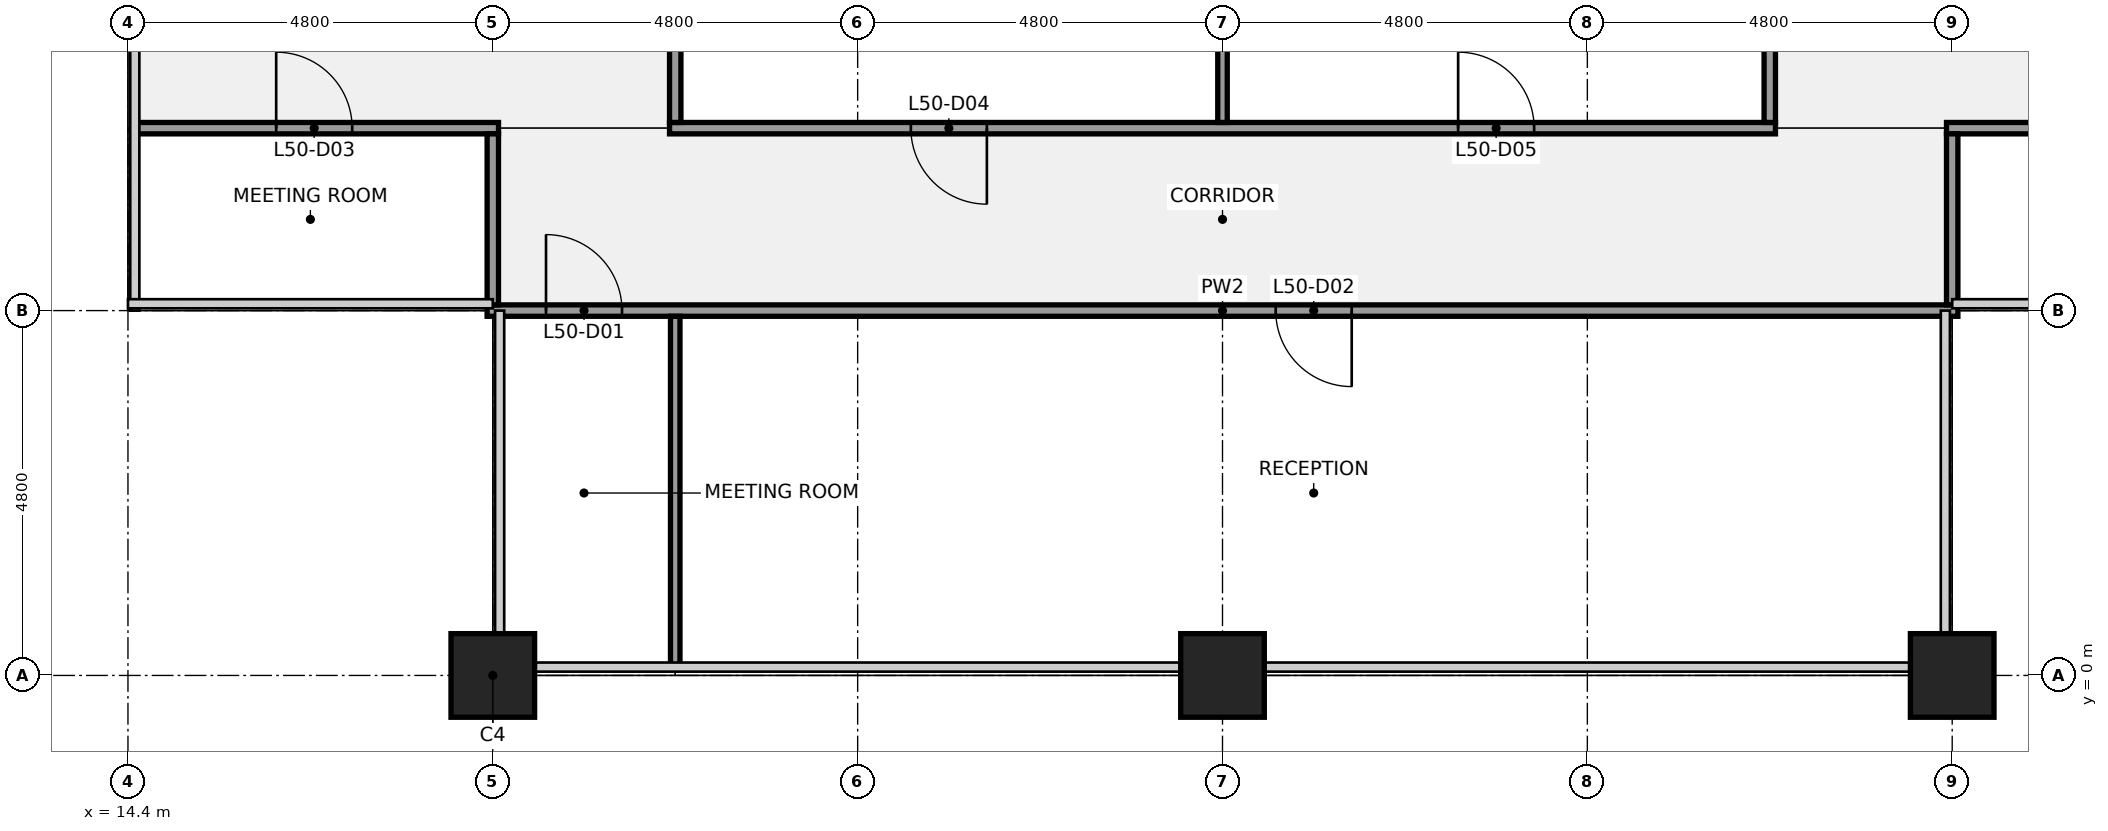
"""IFC4 building model, lengths in metres.
Left out: names, types, materials, properties, quantities, classifications, styles, units other than length and angle.
Written with IfcOpenShell. Run it as: python <this file> out.ifc"""

import sys

from ifc_helpers import new_model, si_unit, direction, frame, frame_2d, origin, origin_2d, place, context, subcontext, project, spatial, rectangle, extrude, element, fill, save


model = new_model("IFC4")
c1 = context("Model", 3, precision=1e-05, world=origin(), true_north=direction((0.0, 1.0)))
c2 = subcontext(c1, "Body", "Model", "MODEL_VIEW")
j1 = project(units=[si_unit("LENGTHUNIT", "METRE"), si_unit("PLANEANGLEUNIT", "RADIAN")], contexts=[c1])
p1 = place(None, origin())
s1 = spatial("IfcSite", under=j1, at=p1, CompositionType="ELEMENT")
p2 = place(p1, origin())
s2 = spatial("IfcBuilding", under=s1, at=p2, CompositionType="ELEMENT")
p3 = place(p2, frame((0.0, 0.0, 229.2)))
s3 = spatial("IfcBuildingStorey", under=s2, at=p3, CompositionType="ELEMENT", Elevation=229.2)
for number, where, z_axis, x_axis in (
    (1, (19.2, 0.0, 0.0), (0.0, 0.0, 1.0), (1.0, 0.0, 0.0)),
    (2, (28.8, 0.0, 0.0), (0.0, 0.0, 1.0), (1.0, 0.0, 0.0)),
    (3, (38.4, 0.0, 0.0), (0.0, 0.0, 1.0), (1.0, 0.0, 0.0)),
):
    element("IfcColumn", number, at=place(p3, frame(where, z_axis=z_axis, x_axis=x_axis)), inside=s3, PredefinedType="COLUMN", context=c2, shape_type="SweptSolid", body=[
        extrude(rectangle(XDim=1.1, YDim=1.1, at=origin_2d()), origin(), (0.0, 0.0, 1.0), 4.0),
    ])
p4 = place(p3, frame((19.125, 4.8, 0.0), z_axis=(0.0, 0.0, 1.0), x_axis=(1.0, 0.0, 0.0)))
e4 = element("IfcWall", 4, at=p4, inside=s3, PredefinedType="PARTITIONING", context=c2, shape_type="SweptSolid", body=[
    extrude(rectangle(XDim=19.35, YDim=0.15, at=frame_2d((9.675, 0.0))), origin(), (0.0, 0.0, 1.0), 2.849),
])
p5 = place(p4, frame((0.775, 0.0, 0.0)))
e5 = element("IfcOpeningElement", 5, at=p5, cuts=e4, PredefinedType="OPENING", context=c2, shape_type="SweptSolid", body=[
    extrude(rectangle(XDim=1.0, YDim=2.1, at=frame_2d((0.5, 1.05))), frame((0.0, 0.085, 0.0), z_axis=(0.0, -1.0, 0.0), x_axis=(1.0, 0.0, 0.0)), (0.0, 0.0, 1.0), 0.17),
])
p6 = place(p4, frame((10.375, 0.0, 0.0)))
e6 = element("IfcOpeningElement", 6, at=p6, cuts=e4, PredefinedType="OPENING", context=c2, shape_type="SweptSolid", body=[
    extrude(rectangle(XDim=1.0, YDim=2.1, at=frame_2d((0.5, 1.05))), frame((0.0, 0.085, 0.0), z_axis=(0.0, -1.0, 0.0), x_axis=(1.0, 0.0, 0.0)), (0.0, 0.0, 1.0), 0.17),
])
p7 = place(p3, frame((14.5, 7.2, 0.0), z_axis=(0.0, 0.0, 1.0), x_axis=(1.0, 0.0, 0.0)))
e7 = element("IfcWall", 7, at=p7, inside=s3, PredefinedType="PARTITIONING", context=c2, shape_type="SweptSolid", body=[
    extrude(rectangle(XDim=4.775, YDim=0.15, at=frame_2d((2.387, 0.0))), origin(), (0.0, 0.0, 1.0), 2.849),
])
p8 = place(p7, frame((1.85, 0.0, 0.0)))
e8 = element("IfcOpeningElement", 8, at=p8, cuts=e7, PredefinedType="OPENING", context=c2, shape_type="SweptSolid", body=[
    extrude(rectangle(XDim=1.0, YDim=2.1, at=frame_2d((0.5, 1.05))), frame((0.0, 0.085, 0.0), z_axis=(0.0, -1.0, 0.0), x_axis=(1.0, 0.0, 0.0)), (0.0, 0.0, 1.0), 0.17),
])
p9 = place(p3, frame((21.525, 7.2, 0.0), z_axis=(0.0, 0.0, 1.0), x_axis=(1.0, 0.0, 0.0)))
e9 = element("IfcWall", 9, at=p9, inside=s3, PredefinedType="PARTITIONING", context=c2, shape_type="SweptSolid", body=[
    extrude(rectangle(XDim=14.55, YDim=0.15, at=frame_2d((7.275, 0.0))), origin(), (0.0, 0.0, 1.0), 2.849),
])
p10 = place(p9, frame((3.175, 0.0, 0.0)))
e10 = element("IfcOpeningElement", 10, at=p10, cuts=e9, PredefinedType="OPENING", context=c2, shape_type="SweptSolid", body=[
    extrude(rectangle(XDim=1.0, YDim=2.1, at=frame_2d((0.5, 1.05))), frame((0.0, 0.085, 0.0), z_axis=(0.0, -1.0, 0.0), x_axis=(1.0, 0.0, 0.0)), (0.0, 0.0, 1.0), 0.17),
])
p11 = place(p9, frame((10.375, 0.0, 0.0)))
e11 = element("IfcOpeningElement", 11, at=p11, cuts=e9, PredefinedType="OPENING", context=c2, shape_type="SweptSolid", body=[
    extrude(rectangle(XDim=1.0, YDim=2.1, at=frame_2d((0.5, 1.05))), frame((0.0, 0.085, 0.0), z_axis=(0.0, -1.0, 0.0), x_axis=(1.0, 0.0, 0.0)), (0.0, 0.0, 1.0), 0.17),
])
p12 = place(p3, frame((38.325, 7.2, 0.0), z_axis=(0.0, 0.0, 1.0), x_axis=(1.0, 0.0, 0.0)))
e12 = element("IfcWall", 12, at=p12, inside=s3, PredefinedType="PARTITIONING", context=c2, shape_type="SweptSolid", body=[
    extrude(rectangle(XDim=4.95, YDim=0.15, at=frame_2d((2.475, 0.0))), origin(), (0.0, 0.0, 1.0), 2.849),
])
p13 = place(p12, frame((1.975, 0.0, 0.0)))
e13 = element("IfcOpeningElement", 13, at=p13, cuts=e12, PredefinedType="OPENING", context=c2, shape_type="SweptSolid", body=[
    extrude(rectangle(XDim=1.0, YDim=2.1, at=frame_2d((0.5, 1.05))), frame((0.0, 0.085, 0.0), z_axis=(0.0, -1.0, 0.0), x_axis=(1.0, 0.0, 0.0)), (0.0, 0.0, 1.0), 0.17),
])
p14 = place(p3, frame((19.2, 4.875, 0.0), z_axis=(0.0, 0.0, 1.0), x_axis=(0.0, 1.0, 0.0)))
e14 = element("IfcWall", 14, at=p14, inside=s3, PredefinedType="PARTITIONING", context=c2, shape_type="SweptSolid", body=[
    extrude(rectangle(XDim=2.25, YDim=0.15, at=frame_2d((1.125, 0.0))), origin(), (0.0, 0.0, 1.0), 2.849),
])
p15 = place(p3, frame((21.6, 0.1, 0.0), z_axis=(0.0, 0.0, 1.0), x_axis=(0.0, 1.0, 0.0)))
e15 = element("IfcWall", 15, at=p15, inside=s3, PredefinedType="PARTITIONING", context=c2, shape_type="SweptSolid", body=[
    extrude(rectangle(XDim=4.625, YDim=0.125, at=frame_2d((2.312, 0.0))), origin(), (0.0, 0.0, 1.0), 2.849),
])
p16 = place(p3, frame((21.6, 7.275, 0.0), z_axis=(0.0, 0.0, 1.0), x_axis=(0.0, 1.0, 0.0)))
e16 = element("IfcWall", 16, at=p16, inside=s3, PredefinedType="PARTITIONING", context=c2, shape_type="SweptSolid", body=[
    extrude(rectangle(XDim=5.863, YDim=0.15, at=frame_2d((2.931, 0.0))), origin(), (0.0, 0.0, 1.0), 2.849),
])
p17 = place(p3, frame((28.8, 7.275, 0.0), z_axis=(0.0, 0.0, 1.0), x_axis=(0.0, 1.0, 0.0)))
e17 = element("IfcWall", 17, at=p17, inside=s3, PredefinedType="PARTITIONING", context=c2, shape_type="SweptSolid", body=[
    extrude(rectangle(XDim=5.863, YDim=0.125, at=frame_2d((2.931, 0.0))), origin(), (0.0, 0.0, 1.0), 2.849),
])
p18 = place(p3, frame((36.0, 7.275, 0.0), z_axis=(0.0, 0.0, 1.0), x_axis=(0.0, 1.0, 0.0)))
e18 = element("IfcWall", 18, at=p18, inside=s3, PredefinedType="PARTITIONING", context=c2, shape_type="SweptSolid", body=[
    extrude(rectangle(XDim=5.863, YDim=0.15, at=frame_2d((2.931, 0.0))), origin(), (0.0, 0.0, 1.0), 2.849),
])
p19 = place(p3, frame((38.4, 4.875, 0.0), z_axis=(0.0, 0.0, 1.0), x_axis=(0.0, 1.0, 0.0)))
e19 = element("IfcWall", 19, at=p19, inside=s3, PredefinedType="PARTITIONING", context=c2, shape_type="SweptSolid", body=[
    extrude(rectangle(XDim=2.25, YDim=0.15, at=frame_2d((1.125, 0.0))), origin(), (0.0, 0.0, 1.0), 2.849),
])
for number, where, z_axis, x_axis in (
    (20, (19.2, -1.025, 0.0), (0.0, 0.0, 1.0), (1.0, 0.0, 0.0)),
    (21, (38.4, -1.025, 0.0), (0.0, 0.0, 1.0), (1.0, 0.0, 0.0)),
):
    element("IfcColumn", number, at=place(p3, frame(where, z_axis=z_axis, x_axis=x_axis)), inside=s3, PredefinedType="PILASTER", context=c2, shape_type="SweptSolid", body=[
        extrude(rectangle(XDim=2.4, YDim=0.95, at=origin_2d()), origin(), (0.0, 0.0, 1.0), 4.0),
    ])
p20 = place(p5, origin())
e22 = element("IfcDoor", 22, at=p20, inside=s3, OperationType="SINGLE_SWING_LEFT", PredefinedType="DOOR", context=c2, shape_type="SweptSolid", body=[
    extrude(rectangle(XDim=1.0, YDim=2.1, at=frame_2d((0.5, 1.05))), frame((0.0, 0.025, 0.0), z_axis=(0.0, -1.0, 0.0), x_axis=(1.0, 0.0, 0.0)), (0.0, 0.0, 1.0), 0.05),
])
fill(e5, e22)
p21 = place(p6, origin())
e23 = element("IfcDoor", 23, at=p21, inside=s3, OperationType="SINGLE_SWING_RIGHT", PredefinedType="DOOR", context=c2, shape_type="SweptSolid", body=[
    extrude(rectangle(XDim=1.0, YDim=2.1, at=frame_2d((0.5, 1.05))), frame((0.0, 0.025, 0.0), z_axis=(0.0, -1.0, 0.0), x_axis=(1.0, 0.0, 0.0)), (0.0, 0.0, 1.0), 0.05),
])
fill(e6, e23)
p22 = place(p8, origin())
e24 = element("IfcDoor", 24, at=p22, inside=s3, OperationType="SINGLE_SWING_LEFT", PredefinedType="DOOR", context=c2, shape_type="SweptSolid", body=[
    extrude(rectangle(XDim=1.0, YDim=2.1, at=frame_2d((0.5, 1.05))), frame((0.0, 0.025, 0.0), z_axis=(0.0, -1.0, 0.0), x_axis=(1.0, 0.0, 0.0)), (0.0, 0.0, 1.0), 0.05),
])
fill(e8, e24)
p23 = place(p10, origin())
e25 = element("IfcDoor", 25, at=p23, inside=s3, OperationType="SINGLE_SWING_RIGHT", PredefinedType="DOOR", context=c2, shape_type="SweptSolid", body=[
    extrude(rectangle(XDim=1.0, YDim=2.1, at=frame_2d((0.5, 1.05))), frame((0.0, 0.025, 0.0), z_axis=(0.0, -1.0, 0.0), x_axis=(1.0, 0.0, 0.0)), (0.0, 0.0, 1.0), 0.05),
])
fill(e10, e25)
p24 = place(p11, origin())
e26 = element("IfcDoor", 26, at=p24, inside=s3, OperationType="SINGLE_SWING_LEFT", PredefinedType="DOOR", context=c2, shape_type="SweptSolid", body=[
    extrude(rectangle(XDim=1.0, YDim=2.1, at=frame_2d((0.5, 1.05))), frame((0.0, 0.025, 0.0), z_axis=(0.0, -1.0, 0.0), x_axis=(1.0, 0.0, 0.0)), (0.0, 0.0, 1.0), 0.05),
])
fill(e11, e26)
save(model, sys.argv[1])
